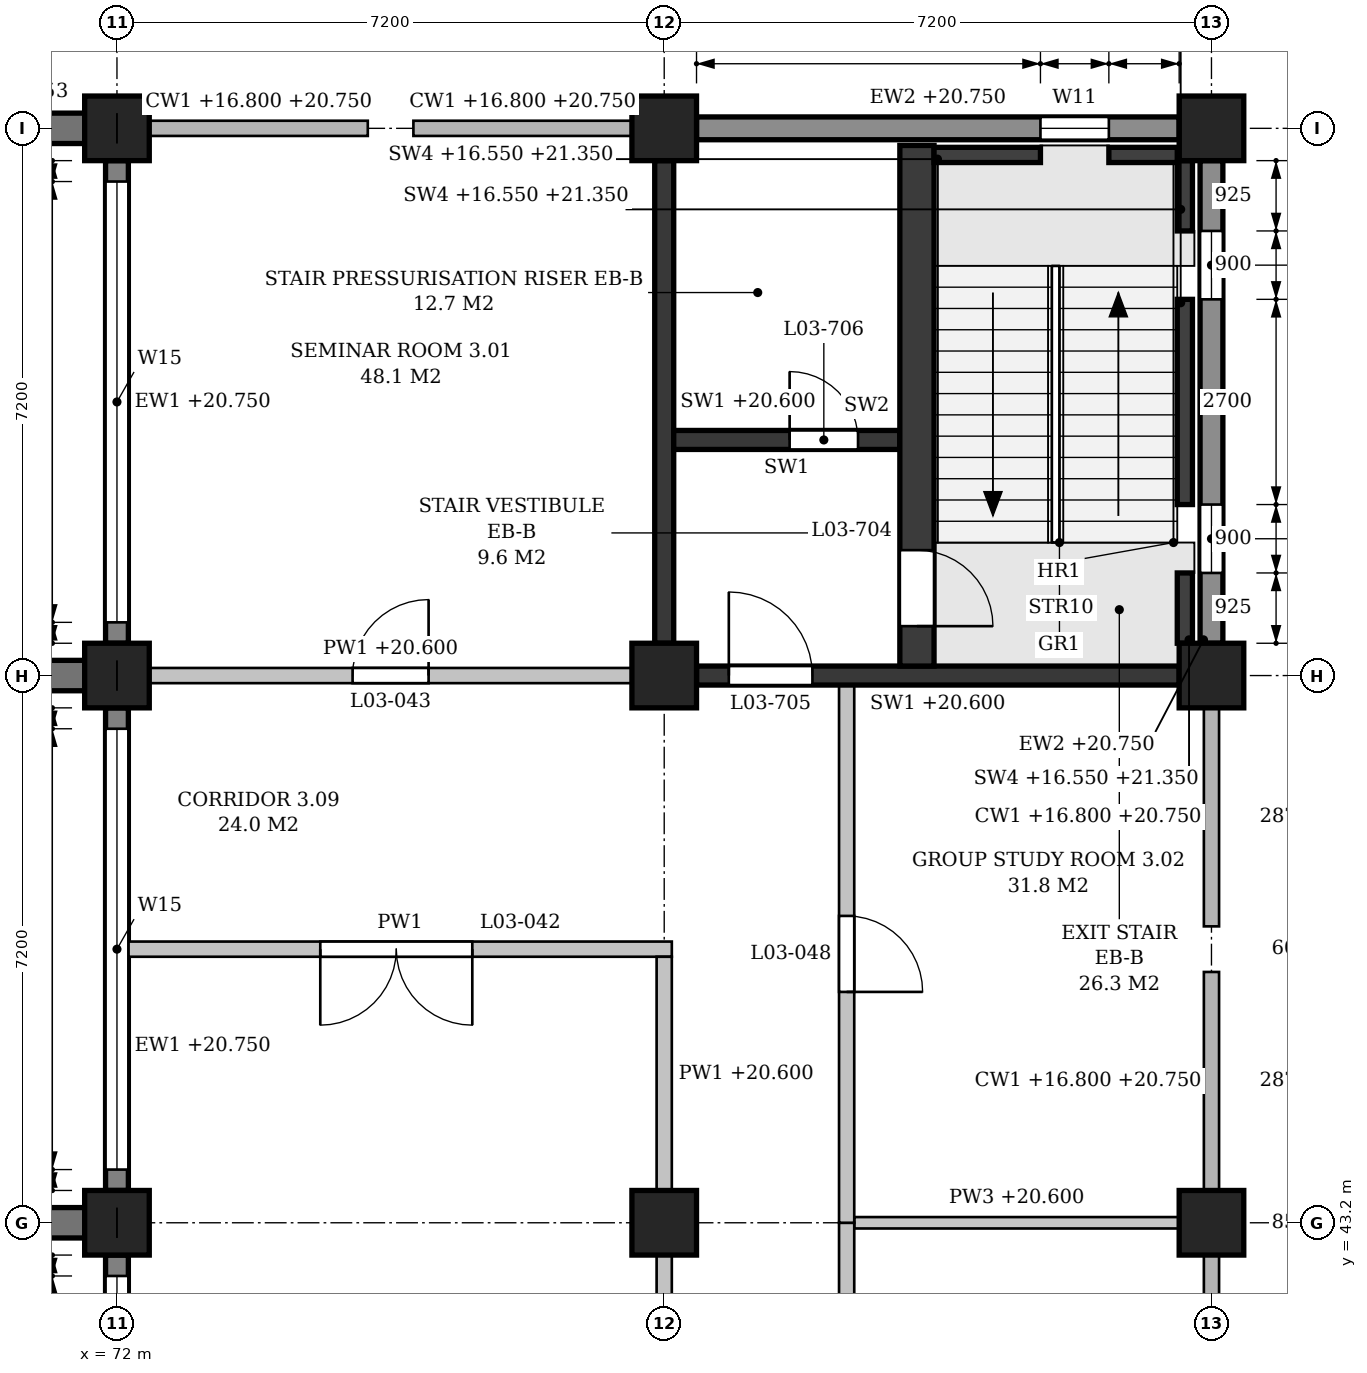
"""IFC4 building model, lengths in metres.
Left out: names, types, materials, properties, quantities, classifications, styles, units other than length and angle.
Written with IfcOpenShell. Run it as: python <this file> out.ifc"""

import sys

from ifc_helpers import new_model, si_unit, direction, frame, frame_2d, origin, origin_2d, place, context, subcontext, project, spatial, polyline, rectangle, outline, extrude, element, fill, save


model = new_model("IFC4")
c1 = context("Model", 3, precision=1e-05, world=origin(), true_north=direction((0.0, 1.0)))
c2 = subcontext(c1, "Body", "Model", "MODEL_VIEW")
j1 = project(units=[si_unit("LENGTHUNIT", "METRE"), si_unit("PLANEANGLEUNIT", "RADIAN")], contexts=[c1])
p1 = place(None, origin())
s1 = spatial("IfcSite", under=j1, at=p1, CompositionType="ELEMENT")
p2 = place(p1, origin())
s2 = spatial("IfcBuilding", under=s1, at=p2, CompositionType="ELEMENT")
p3 = place(p2, frame((0.0, 0.0, 16.8)))
s3 = spatial("IfcBuildingStorey", under=s2, at=p3, CompositionType="ELEMENT", Elevation=16.8)
for number, where, z_axis, x_axis in (
    (1, (72.0, 43.2, 0.0), (0.0, 0.0, 1.0), (1.0, 0.0, 0.0)),
    (2, (72.0, 50.4, 0.0), (0.0, 0.0, 1.0), (1.0, 0.0, 0.0)),
    (3, (72.0, 57.6, 0.0), (0.0, 0.0, 1.0), (1.0, 0.0, 0.0)),
    (4, (79.2, 43.2, 0.0), (0.0, 0.0, 1.0), (1.0, 0.0, 0.0)),
    (5, (79.2, 50.4, 0.0), (0.0, 0.0, 1.0), (1.0, 0.0, 0.0)),
    (6, (79.2, 57.6, 0.0), (0.0, 0.0, 1.0), (1.0, 0.0, 0.0)),
    (7, (86.4, 43.2, 0.0), (0.0, 0.0, 1.0), (1.0, 0.0, 0.0)),
    (8, (86.4, 50.4, 0.0), (0.0, 0.0, 1.0), (1.0, 0.0, 0.0)),
    (9, (86.4, 57.6, 0.0), (0.0, 0.0, 1.0), (1.0, 0.0, 0.0)),
):
    element("IfcColumn", number, at=place(p3, frame(where, z_axis=z_axis, x_axis=x_axis)), inside=s3, PredefinedType="COLUMN", context=c2, shape_type="SweptSolid", body=[
        extrude(rectangle(XDim=0.85, YDim=0.85, at=origin_2d()), origin(), (0.0, 0.0, 1.0), 4.8),
    ])
p4 = place(p3, frame((86.4, 50.825, 0.0), z_axis=(0.0, 0.0, 1.0), x_axis=(0.0, 1.0, 0.0)))
e10 = element("IfcWall", 10, at=p4, inside=s3, PredefinedType="STANDARD", context=c2, shape_type="SweptSolid", body=[
    extrude(rectangle(XDim=6.35, YDim=0.3, at=frame_2d((3.175, 0.0))), origin(), (0.0, 0.0, 1.0), 3.95),
])
p5 = place(p4, frame((0.925, 0.0, 0.9)))
e11 = element("IfcOpeningElement", 11, at=p5, cuts=e10, PredefinedType="OPENING", context=c2, shape_type="SweptSolid", body=[
    extrude(outline(polyline([(0.0, 0.0), (0.9, 0.0), (0.9, 2.05), (0.45, 2.5), (0.0, 2.05), (0.0, 0.0)])), frame((0.0, 0.16, 0.0), z_axis=(0.0, -1.0, 0.0), x_axis=(1.0, 0.0, 0.0)), (0.0, 0.0, 1.0), 0.32),
])
p6 = place(p4, frame((4.525, 0.0, 0.9)))
e12 = element("IfcOpeningElement", 12, at=p6, cuts=e10, PredefinedType="OPENING", context=c2, shape_type="SweptSolid", body=[
    extrude(outline(polyline([(0.0, 0.0), (0.9, 0.0), (0.9, 2.05), (0.45, 2.5), (0.0, 2.05), (0.0, 0.0)])), frame((0.0, 0.16, 0.0), z_axis=(0.0, -1.0, 0.0), x_axis=(1.0, 0.0, 0.0)), (0.0, 0.0, 1.0), 0.32),
])
p7 = place(p3, frame((85.975, 57.6, 0.0), z_axis=(0.0, 0.0, 1.0), x_axis=(-1.0, 0.0, 0.0)))
e13 = element("IfcWall", 13, at=p7, inside=s3, PredefinedType="STANDARD", context=c2, shape_type="SweptSolid", body=[
    extrude(rectangle(XDim=6.35, YDim=0.3, at=frame_2d((3.175, 0.0))), origin(), (0.0, 0.0, 1.0), 3.95),
])
p8 = place(p7, frame((0.925, 0.0, 0.9)))
e14 = element("IfcOpeningElement", 14, at=p8, cuts=e13, PredefinedType="OPENING", context=c2, shape_type="SweptSolid", body=[
    extrude(outline(polyline([(0.0, 0.0), (0.9, 0.0), (0.9, 2.05), (0.45, 2.5), (0.0, 2.05), (0.0, 0.0)])), frame((0.0, 0.16, 0.0), z_axis=(0.0, -1.0, 0.0), x_axis=(1.0, 0.0, 0.0)), (0.0, 0.0, 1.0), 0.32),
])
p9 = place(p3, frame((72.0, 36.425, 0.0), z_axis=(0.0, 0.0, 1.0), x_axis=(0.0, 1.0, 0.0)))
e15 = element("IfcWall", 15, at=p9, inside=s3, PredefinedType="STANDARD", context=c2, shape_type="SweptSolid", body=[
    extrude(rectangle(XDim=6.35, YDim=0.3, at=frame_2d((3.175, 0.0))), origin(), (0.0, 0.0, 1.0), 3.95),
])
p10 = place(p9, frame((0.275, 0.0, 0.9)))
e16 = element("IfcOpeningElement", 16, at=p10, cuts=e15, PredefinedType="OPENING", context=c2, shape_type="SweptSolid", body=[
    extrude(outline(polyline([(0.0, 0.0), (5.8, 0.0), (5.8, 1.0), (2.9, 2.5), (0.0, 1.0), (0.0, 0.0)])), frame((0.0, 0.16, 0.0), z_axis=(0.0, -1.0, 0.0), x_axis=(1.0, 0.0, 0.0)), (0.0, 0.0, 1.0), 0.32),
])
p11 = place(p3, frame((72.0, 43.625, 0.0), z_axis=(0.0, 0.0, 1.0), x_axis=(0.0, 1.0, 0.0)))
e17 = element("IfcWall", 17, at=p11, inside=s3, PredefinedType="STANDARD", context=c2, shape_type="SweptSolid", body=[
    extrude(rectangle(XDim=6.35, YDim=0.3, at=frame_2d((3.175, 0.0))), origin(), (0.0, 0.0, 1.0), 3.95),
])
p12 = place(p11, frame((0.275, 0.0, 0.9)))
e18 = element("IfcOpeningElement", 18, at=p12, cuts=e17, PredefinedType="OPENING", context=c2, shape_type="SweptSolid", body=[
    extrude(outline(polyline([(0.0, 0.0), (5.8, 0.0), (5.8, 1.0), (2.9, 2.5), (0.0, 1.0), (0.0, 0.0)])), frame((0.0, 0.16, 0.0), z_axis=(0.0, -1.0, 0.0), x_axis=(1.0, 0.0, 0.0)), (0.0, 0.0, 1.0), 0.32),
])
p13 = place(p3, frame((72.0, 50.825, 0.0), z_axis=(0.0, 0.0, 1.0), x_axis=(0.0, 1.0, 0.0)))
e19 = element("IfcWall", 19, at=p13, inside=s3, PredefinedType="STANDARD", context=c2, shape_type="SweptSolid", body=[
    extrude(rectangle(XDim=6.35, YDim=0.3, at=frame_2d((3.175, 0.0))), origin(), (0.0, 0.0, 1.0), 3.95),
])
p14 = place(p13, frame((0.275, 0.0, 0.9)))
e20 = element("IfcOpeningElement", 20, at=p14, cuts=e19, PredefinedType="OPENING", context=c2, shape_type="SweptSolid", body=[
    extrude(outline(polyline([(0.0, 0.0), (5.8, 0.0), (5.8, 1.0), (2.9, 2.5), (0.0, 1.0), (0.0, 0.0)])), frame((0.0, 0.16, 0.0), z_axis=(0.0, -1.0, 0.0), x_axis=(1.0, 0.0, 0.0)), (0.0, 0.0, 1.0), 0.32),
])
for number, where, z_axis, x_axis in (
    (21, (71.575, 43.2, 0.0), (0.0, 0.0, 1.0), (-1.0, 0.0, 0.0)),
    (22, (71.575, 50.4, 0.0), (0.0, 0.0, 1.0), (-1.0, 0.0, 0.0)),
    (23, (71.575, 57.6, 0.0), (0.0, 0.0, 1.0), (-1.0, 0.0, 0.0)),
):
    element("IfcWall", number, at=place(p3, frame(where, z_axis=z_axis, x_axis=x_axis)), inside=s3, PredefinedType="POLYGONAL", context=c2, shape_type="SweptSolid", body=[
        extrude(outline(polyline([(0.6, 0.0), (0.6, 4.55), (0.0, 4.55), (0.0, 0.0), (0.6, 0.0)])), frame((0.0, 0.2, 0.0), z_axis=(0.0, -1.0, 0.0), x_axis=(1.0, 0.0, 0.0)), (0.0, 0.0, 1.0), 0.4),
    ])
p15 = place(p3, frame((79.625, 50.4, 0.0), z_axis=(0.0, 0.0, 1.0), x_axis=(1.0, 0.0, 0.0)))
e24 = element("IfcWall", 24, at=p15, inside=s3, PredefinedType="SHEAR", context=c2, shape_type="SweptSolid", body=[
    extrude(rectangle(XDim=6.35, YDim=0.25, at=frame_2d((3.175, 0.0))), origin(), (0.0, 0.0, 1.0), 3.8),
])
p16 = place(p15, frame((0.425, 0.0, 0.0)))
e25 = element("IfcOpeningElement", 25, at=p16, cuts=e24, PredefinedType="OPENING", context=c2, shape_type="SweptSolid", body=[
    extrude(rectangle(XDim=1.1, YDim=2.1, at=frame_2d((0.55, 1.05))), frame((0.0, 0.135, 0.0), z_axis=(0.0, -1.0, 0.0), x_axis=(1.0, 0.0, 0.0)), (0.0, 0.0, 1.0), 0.27),
])
p17 = place(p3, frame((79.2, 50.825, 0.0), z_axis=(0.0, 0.0, 1.0), x_axis=(0.0, 1.0, 0.0)))
e26 = element("IfcWall", 26, at=p17, inside=s3, PredefinedType="SHEAR", context=c2, shape_type="SweptSolid", body=[
    extrude(rectangle(XDim=6.35, YDim=0.25, at=frame_2d((3.175, 0.0))), origin(), (0.0, 0.0, 1.0), 3.8),
])
p18 = place(p3, frame((86.05, 50.825, -0.25), z_axis=(0.0, 0.0, 1.0), x_axis=(0.0, 1.0, 0.0)))
e27 = element("IfcWall", 27, at=p18, inside=s3, PredefinedType="SHEAR", context=c2, shape_type="SweptSolid", body=[
    extrude(rectangle(XDim=0.925, YDim=0.2, at=frame_2d((0.462, 0.0))), origin(), (0.0, 0.0, 1.0), 4.8),
])
p19 = place(p3, frame((86.05, 52.65, -0.25), z_axis=(0.0, 0.0, 1.0), x_axis=(0.0, 1.0, 0.0)))
e28 = element("IfcWall", 28, at=p19, inside=s3, PredefinedType="SHEAR", context=c2, shape_type="SweptSolid", body=[
    extrude(rectangle(XDim=2.7, YDim=0.2, at=frame_2d((1.35, 0.0))), origin(), (0.0, 0.0, 1.0), 4.8),
])
p20 = place(p3, frame((86.05, 56.25, -0.25), z_axis=(0.0, 0.0, 1.0), x_axis=(0.0, 1.0, 0.0)))
e29 = element("IfcWall", 29, at=p20, inside=s3, PredefinedType="SHEAR", context=c2, shape_type="SweptSolid", body=[
    extrude(rectangle(XDim=0.925, YDim=0.2, at=frame_2d((0.462, 0.0))), origin(), (0.0, 0.0, 1.0), 4.8),
])
p21 = place(p3, frame((82.75, 57.25, -0.25), z_axis=(0.0, 0.0, 1.0), x_axis=(1.0, 0.0, 0.0)))
e30 = element("IfcWall", 30, at=p21, inside=s3, PredefinedType="SHEAR", context=c2, shape_type="SweptSolid", body=[
    extrude(rectangle(XDim=1.4, YDim=0.2, at=frame_2d((0.7, 0.0))), origin(), (0.0, 0.0, 1.0), 4.8),
])
p22 = place(p3, frame((85.05, 57.25, -0.25), z_axis=(0.0, 0.0, 1.0), x_axis=(1.0, 0.0, 0.0)))
e31 = element("IfcWall", 31, at=p22, inside=s3, PredefinedType="SHEAR", context=c2, shape_type="SweptSolid", body=[
    extrude(rectangle(XDim=0.9, YDim=0.2, at=frame_2d((0.45, 0.0))), origin(), (0.0, 0.0, 1.0), 4.8),
])
p23 = place(p3, frame((82.525, 50.525, 0.0), z_axis=(0.0, 0.0, 1.0), x_axis=(0.0, 1.0, 0.0)))
e32 = element("IfcWall", 32, at=p23, inside=s3, PredefinedType="SHEAR", context=c2, shape_type="SweptSolid", body=[
    extrude(rectangle(XDim=6.85, YDim=0.45, at=frame_2d((3.425, 0.0))), origin(), (0.0, 0.0, 1.0), 4.55),
])
p24 = place(p23, frame((0.525, 0.0, 0.0)))
e33 = element("IfcOpeningElement", 33, at=p24, cuts=e32, PredefinedType="OPENING", context=c2, shape_type="SweptSolid", body=[
    extrude(rectangle(XDim=1.0, YDim=2.1, at=frame_2d((0.5, 1.05))), frame((0.0, 0.235, 0.0), z_axis=(0.0, -1.0, 0.0), x_axis=(1.0, 0.0, 0.0)), (0.0, 0.0, 1.0), 0.47),
])
p25 = place(p3, frame((79.325, 53.5, 0.0), z_axis=(0.0, 0.0, 1.0), x_axis=(1.0, 0.0, 0.0)))
e34 = element("IfcWall", 34, at=p25, inside=s3, PredefinedType="SHEAR", context=c2, shape_type="SweptSolid", body=[
    extrude(rectangle(XDim=2.975, YDim=0.25, at=frame_2d((1.488, 0.0))), origin(), (0.0, 0.0, 1.0), 4.55),
])
p26 = place(p25, frame((1.525, 0.0, 0.0)))
e35 = element("IfcOpeningElement", 35, at=p26, cuts=e34, PredefinedType="OPENING", context=c2, shape_type="SweptSolid", body=[
    extrude(rectangle(XDim=0.9, YDim=2.1, at=frame_2d((0.45, 1.05))), frame((0.0, 0.135, 0.0), z_axis=(0.0, -1.0, 0.0), x_axis=(1.0, 0.0, 0.0)), (0.0, 0.0, 1.0), 0.27),
])
p27 = place(p3, frame((81.7, 43.2, 0.0), z_axis=(0.0, 0.0, 1.0), x_axis=(1.0, 0.0, 0.0)))
e36 = element("IfcWall", 36, at=p27, inside=s3, PredefinedType="PARTITIONING", context=c2, shape_type="SweptSolid", body=[
    extrude(rectangle(XDim=4.275, YDim=0.15, at=frame_2d((2.138, 0.0))), origin(), (0.0, 0.0, 1.0), 3.8),
])
p28 = place(p3, frame((72.15, 46.8, 0.0), z_axis=(0.0, 0.0, 1.0), x_axis=(1.0, 0.0, 0.0)))
e37 = element("IfcWall", 37, at=p28, inside=s3, PredefinedType="PARTITIONING", context=c2, shape_type="SweptSolid", body=[
    extrude(outline(polyline([(0.0, 0.0), (7.15, 0.0), (7.15, 3.8), (6.8, 3.8), (6.8, 4.55), (0.1, 4.55), (0.1, 3.95), (0.0, 3.95), (0.0, 0.0)])), frame((0.0, 0.1, 0.0), z_axis=(0.0, -1.0, 0.0), x_axis=(1.0, 0.0, 0.0)), (0.0, 0.0, 1.0), 0.2),
])
p29 = place(p28, frame((2.525, 0.0, 0.0)))
e38 = element("IfcOpeningElement", 38, at=p29, cuts=e37, PredefinedType="OPENING", context=c2, shape_type="SweptSolid", body=[
    extrude(rectangle(XDim=2.0, YDim=2.1, at=frame_2d((1.0, 1.05))), frame((0.0, 0.11, 0.0), z_axis=(0.0, -1.0, 0.0), x_axis=(1.0, 0.0, 0.0)), (0.0, 0.0, 1.0), 0.22),
])
p30 = place(p3, frame((72.425, 50.4, 0.0), z_axis=(0.0, 0.0, 1.0), x_axis=(1.0, 0.0, 0.0)))
e39 = element("IfcWall", 39, at=p30, inside=s3, PredefinedType="PARTITIONING", context=c2, shape_type="SweptSolid", body=[
    extrude(rectangle(XDim=6.35, YDim=0.2, at=frame_2d((3.175, 0.0))), origin(), (0.0, 0.0, 1.0), 3.8),
])
p31 = place(p30, frame((2.675, 0.0, 0.0)))
e40 = element("IfcOpeningElement", 40, at=p31, cuts=e39, PredefinedType="OPENING", context=c2, shape_type="SweptSolid", body=[
    extrude(rectangle(XDim=1.0, YDim=2.1, at=frame_2d((0.5, 1.05))), frame((0.0, 0.11, 0.0), z_axis=(0.0, -1.0, 0.0), x_axis=(1.0, 0.0, 0.0)), (0.0, 0.0, 1.0), 0.22),
])
p32 = place(p3, frame((79.2, 36.425, 0.0), z_axis=(0.0, 0.0, 1.0), x_axis=(0.0, 1.0, 0.0)))
e41 = element("IfcWall", 41, at=p32, inside=s3, PredefinedType="PARTITIONING", context=c2, shape_type="SweptSolid", body=[
    extrude(rectangle(XDim=6.35, YDim=0.2, at=frame_2d((3.175, 0.0))), origin(), (0.0, 0.0, 1.0), 3.8),
])
p33 = place(p32, frame((0.587, 0.0, 0.0)))
e42 = element("IfcOpeningElement", 42, at=p33, cuts=e41, PredefinedType="OPENING", context=c2, shape_type="SweptSolid", body=[
    extrude(rectangle(XDim=2.0, YDim=2.1, at=frame_2d((1.0, 1.05))), frame((0.0, 0.11, 0.0), z_axis=(0.0, -1.0, 0.0), x_axis=(1.0, 0.0, 0.0)), (0.0, 0.0, 1.0), 0.22),
])
p34 = place(p3, frame((79.2, 43.625, 0.0), z_axis=(0.0, 0.0, 1.0), x_axis=(0.0, 1.0, 0.0)))
e43 = element("IfcWall", 43, at=p34, inside=s3, PredefinedType="PARTITIONING", context=c2, shape_type="SweptSolid", body=[
    extrude(rectangle(XDim=3.075, YDim=0.2, at=frame_2d((1.538, 0.0))), origin(), (0.0, 0.0, 1.0), 3.8),
])
p35 = place(p3, frame((81.6, 36.0, 0.0), z_axis=(0.0, 0.0, 1.0), x_axis=(0.0, 1.0, 0.0)))
e44 = element("IfcWall", 44, at=p35, inside=s3, PredefinedType="PARTITIONING", context=c2, shape_type="SweptSolid", body=[
    extrude(outline(polyline([(0.0, 0.0), (7.2, 0.0), (7.2, 3.8), (6.95, 3.8), (6.95, 4.55), (0.25, 4.55), (0.25, 3.8), (0.0, 3.8), (0.0, 0.0)])), frame((0.0, 0.1, 0.0), z_axis=(0.0, -1.0, 0.0), x_axis=(1.0, 0.0, 0.0)), (0.0, 0.0, 1.0), 0.2),
])
p36 = place(p35, frame((2.6, 0.0, 0.0)))
e45 = element("IfcOpeningElement", 45, at=p36, cuts=e44, PredefinedType="OPENING", context=c2, shape_type="SweptSolid", body=[
    extrude(rectangle(XDim=2.0, YDim=2.1, at=frame_2d((1.0, 1.05))), frame((0.0, 0.11, 0.0), z_axis=(0.0, -1.0, 0.0), x_axis=(1.0, 0.0, 0.0)), (0.0, 0.0, 1.0), 0.22),
])
p37 = place(p3, frame((81.6, 43.2, 0.0), z_axis=(0.0, 0.0, 1.0), x_axis=(0.0, 1.0, 0.0)))
e46 = element("IfcWall", 46, at=p37, inside=s3, PredefinedType="PARTITIONING", context=c2, shape_type="SweptSolid", body=[
    extrude(outline(polyline([(0.0, 0.0), (7.075, 0.0), (7.075, 3.8), (6.95, 3.8), (6.95, 4.55), (0.25, 4.55), (0.25, 3.8), (0.0, 3.8), (0.0, 0.0)])), frame((0.0, 0.1, 0.0), z_axis=(0.0, -1.0, 0.0), x_axis=(1.0, 0.0, 0.0)), (0.0, 0.0, 1.0), 0.2),
])
p38 = place(p37, frame((3.038, 0.0, 0.0)))
e47 = element("IfcOpeningElement", 47, at=p38, cuts=e46, PredefinedType="OPENING", context=c2, shape_type="SweptSolid", body=[
    extrude(rectangle(XDim=1.0, YDim=2.1, at=frame_2d((0.5, 1.05))), frame((0.0, 0.11, 0.0), z_axis=(0.0, -1.0, 0.0), x_axis=(1.0, 0.0, 0.0)), (0.0, 0.0, 1.0), 0.22),
])
p39 = place(p5, origin())
e48 = element("IfcWindow", 48, at=p39, inside=s3, PartitioningType="SINGLE_PANEL", PredefinedType="WINDOW", context=c2, shape_type="SweptSolid", body=[
    extrude(outline(polyline([(0.0, 0.0), (0.9, 0.0), (0.9, 2.05), (0.45, 2.5), (0.0, 2.05), (0.0, 0.0)])), frame((0.0, 0.03, 0.0), z_axis=(0.0, -1.0, 0.0), x_axis=(1.0, 0.0, 0.0)), (0.0, 0.0, 1.0), 0.06),
])
fill(e11, e48)
p40 = place(p6, origin())
e49 = element("IfcWindow", 49, at=p40, inside=s3, PartitioningType="SINGLE_PANEL", PredefinedType="WINDOW", context=c2, shape_type="SweptSolid", body=[
    extrude(outline(polyline([(0.0, 0.0), (0.9, 0.0), (0.9, 2.05), (0.45, 2.5), (0.0, 2.05), (0.0, 0.0)])), frame((0.0, 0.03, 0.0), z_axis=(0.0, -1.0, 0.0), x_axis=(1.0, 0.0, 0.0)), (0.0, 0.0, 1.0), 0.06),
])
fill(e12, e49)
p41 = place(p8, origin())
e50 = element("IfcWindow", 50, at=p41, inside=s3, PartitioningType="SINGLE_PANEL", PredefinedType="WINDOW", context=c2, shape_type="SweptSolid", body=[
    extrude(outline(polyline([(0.0, 0.0), (0.9, 0.0), (0.9, 2.05), (0.45, 2.5), (0.0, 2.05), (0.0, 0.0)])), frame((0.0, 0.03, 0.0), z_axis=(0.0, -1.0, 0.0), x_axis=(1.0, 0.0, 0.0)), (0.0, 0.0, 1.0), 0.06),
])
fill(e14, e50)
p42 = place(p10, origin())
e51 = element("IfcWindow", 51, at=p42, inside=s3, PartitioningType="TRIPLE_PANEL_VERTICAL", PredefinedType="WINDOW", context=c2, shape_type="SweptSolid", body=[
    extrude(outline(polyline([(0.0, 0.0), (5.8, 0.0), (5.8, 1.0), (2.9, 2.5), (0.0, 1.0), (0.0, 0.0)])), frame((0.0, 0.03, 0.0), z_axis=(0.0, -1.0, 0.0), x_axis=(1.0, 0.0, 0.0)), (0.0, 0.0, 1.0), 0.06),
])
fill(e16, e51)
p43 = place(p12, origin())
e52 = element("IfcWindow", 52, at=p43, inside=s3, PartitioningType="TRIPLE_PANEL_VERTICAL", PredefinedType="WINDOW", context=c2, shape_type="SweptSolid", body=[
    extrude(outline(polyline([(0.0, 0.0), (5.8, 0.0), (5.8, 1.0), (2.9, 2.5), (0.0, 1.0), (0.0, 0.0)])), frame((0.0, 0.03, 0.0), z_axis=(0.0, -1.0, 0.0), x_axis=(1.0, 0.0, 0.0)), (0.0, 0.0, 1.0), 0.06),
])
fill(e18, e52)
p44 = place(p14, origin())
e53 = element("IfcWindow", 53, at=p44, inside=s3, PartitioningType="TRIPLE_PANEL_VERTICAL", PredefinedType="WINDOW", context=c2, shape_type="SweptSolid", body=[
    extrude(outline(polyline([(0.0, 0.0), (5.8, 0.0), (5.8, 1.0), (2.9, 2.5), (0.0, 1.0), (0.0, 0.0)])), frame((0.0, 0.03, 0.0), z_axis=(0.0, -1.0, 0.0), x_axis=(1.0, 0.0, 0.0)), (0.0, 0.0, 1.0), 0.06),
])
fill(e20, e53)
p45 = place(p24, frame((1.0, 0.0, 0.0), z_axis=(0.0, 0.0, 1.0), x_axis=(-1.0, 0.0, 0.0)))
e54 = element("IfcDoor", 54, at=p45, inside=s3, OperationType="SINGLE_SWING_RIGHT", PredefinedType="DOOR", context=c2, shape_type="SweptSolid", body=[
    extrude(rectangle(XDim=1.0, YDim=2.1, at=frame_2d((0.5, 1.05))), frame((0.0, 0.025, 0.0), z_axis=(0.0, -1.0, 0.0), x_axis=(1.0, 0.0, 0.0)), (0.0, 0.0, 1.0), 0.05),
])
fill(e33, e54)
p46 = place(p16, origin())
e55 = element("IfcDoor", 55, at=p46, inside=s3, OperationType="SINGLE_SWING_LEFT", PredefinedType="DOOR", context=c2, shape_type="SweptSolid", body=[
    extrude(rectangle(XDim=1.1, YDim=2.1, at=frame_2d((0.55, 1.05))), frame((0.0, 0.025, 0.0), z_axis=(0.0, -1.0, 0.0), x_axis=(1.0, 0.0, 0.0)), (0.0, 0.0, 1.0), 0.05),
])
fill(e25, e55)
p47 = place(p26, origin())
e56 = element("IfcDoor", 56, at=p47, inside=s3, OperationType="SINGLE_SWING_LEFT", PredefinedType="DOOR", context=c2, shape_type="SweptSolid", body=[
    extrude(rectangle(XDim=0.9, YDim=2.1, at=frame_2d((0.45, 1.05))), frame((0.0, 0.025, 0.0), z_axis=(0.0, -1.0, 0.0), x_axis=(1.0, 0.0, 0.0)), (0.0, 0.0, 1.0), 0.05),
])
fill(e35, e56)
p48 = place(p29, origin())
e57 = element("IfcDoor", 57, at=p48, inside=s3, OperationType="DOUBLE_DOOR_SINGLE_SWING", PredefinedType="DOOR", context=c2, shape_type="SweptSolid", body=[
    extrude(rectangle(XDim=2.0, YDim=2.1, at=frame_2d((1.0, 1.05))), frame((0.0, 0.025, 0.0), z_axis=(0.0, -1.0, 0.0), x_axis=(1.0, 0.0, 0.0)), (0.0, 0.0, 1.0), 0.05),
])
fill(e38, e57)
p49 = place(p31, origin())
e58 = element("IfcDoor", 58, at=p49, inside=s3, OperationType="SINGLE_SWING_RIGHT", PredefinedType="DOOR", context=c2, shape_type="SweptSolid", body=[
    extrude(rectangle(XDim=1.0, YDim=2.1, at=frame_2d((0.5, 1.05))), frame((0.0, 0.025, 0.0), z_axis=(0.0, -1.0, 0.0), x_axis=(1.0, 0.0, 0.0)), (0.0, 0.0, 1.0), 0.05),
])
fill(e40, e58)
p50 = place(p38, frame((1.0, 0.0, 0.0), z_axis=(0.0, 0.0, 1.0), x_axis=(-1.0, 0.0, 0.0)))
e59 = element("IfcDoor", 59, at=p50, inside=s3, OperationType="SINGLE_SWING_RIGHT", PredefinedType="DOOR", context=c2, shape_type="SweptSolid", body=[
    extrude(rectangle(XDim=1.0, YDim=2.1, at=frame_2d((0.5, 1.05))), frame((0.0, 0.025, 0.0), z_axis=(0.0, -1.0, 0.0), x_axis=(1.0, 0.0, 0.0)), (0.0, 0.0, 1.0), 0.05),
])
fill(e47, e59)
save(model, sys.argv[1])
